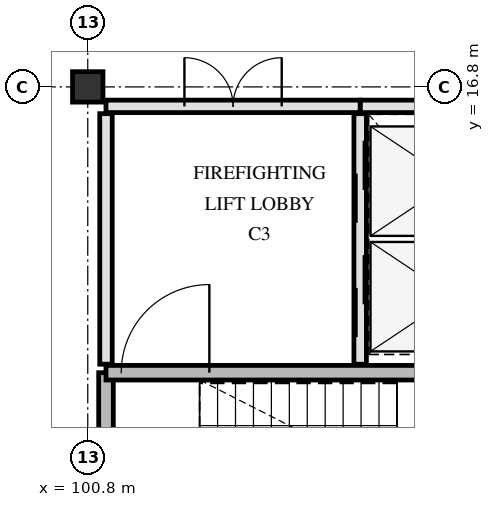
"""IFC4 building model, lengths in metres.
Left out: names, types, materials, properties, quantities, classifications, styles, units other than length and angle.
Written with IfcOpenShell. Run it as: python <this file> out.ifc"""

import sys

from ifc_helpers import new_model, si_unit, direction, frame, frame_2d, origin, origin_2d, place, context, subcontext, project, spatial, rectangle, extrude, element, fill, save


model = new_model("IFC4")
c1 = context("Model", 3, precision=1e-05, world=origin(), true_north=direction((0.0, 1.0)))
c2 = subcontext(c1, "Body", "Model", "MODEL_VIEW")
j1 = project(units=[si_unit("LENGTHUNIT", "METRE"), si_unit("PLANEANGLEUNIT", "RADIAN")], contexts=[c1])
p1 = place(None, origin())
s1 = spatial("IfcSite", under=j1, at=p1, CompositionType="ELEMENT")
p2 = place(p1, origin())
s2 = spatial("IfcBuilding", under=s1, at=p2, CompositionType="ELEMENT")
p3 = place(p2, frame((0.0, 0.0, 26.4)))
s3 = spatial("IfcBuildingStorey", under=s2, at=p3, CompositionType="ELEMENT", Elevation=26.4)
p4 = place(p3, frame((100.8, 16.8, 0.0), z_axis=(0.0, 0.0, 1.0), x_axis=(1.0, 0.0, 0.0)))
e1 = element("IfcColumn", 1, at=p4, inside=s3, PredefinedType="COLUMN", context=c2, shape_type="SweptSolid", body=[
    extrude(rectangle(XDim=0.5, YDim=0.5, at=origin_2d()), origin(), (0.0, 0.0, 1.0), 3.9),
])
p5 = place(p3, frame((101.1, 8.78, 0.0), z_axis=(0.0, 0.0, 1.0), x_axis=(0.0, 1.0, 0.0)))
e2 = element("IfcWall", 2, at=p5, inside=s3, PredefinedType="SHEAR", context=c2, shape_type="SweptSolid", body=[
    extrude(rectangle(XDim=3.32, YDim=0.24, at=frame_2d((1.66, 0.0))), origin(), (0.0, 0.0, 1.0), 3.62),
])
p6 = place(p3, frame((101.1, 12.1, 0.0), z_axis=(0.0, 0.0, 1.0), x_axis=(1.0, 0.0, 0.0)))
e3 = element("IfcWall", 3, at=p6, inside=s3, PredefinedType="SHEAR", context=c2, shape_type="SweptSolid", body=[
    extrude(rectangle(XDim=7.82, YDim=0.24, at=frame_2d((3.91, 0.0))), origin(), (0.0, 0.0, 1.0), 3.62),
])
p7 = place(p6, frame((0.25, 0.0, 0.0)))
e4 = element("IfcOpeningElement", 4, at=p7, cuts=e3, PredefinedType="OPENING", context=c2, shape_type="SweptSolid", body=[
    extrude(rectangle(XDim=1.45, YDim=2.2, at=frame_2d((0.725, 1.1))), frame((0.0, 0.13, 0.0), z_axis=(0.0, -1.0, 0.0), x_axis=(1.0, 0.0, 0.0)), (0.0, 0.0, 1.0), 0.26),
])
p8 = place(p3, frame((105.28, 12.24, 0.0), z_axis=(0.0, 0.0, 1.0), x_axis=(0.0, 1.0, 0.0)))
e5 = element("IfcWall", 5, at=p8, inside=s3, PredefinedType="PARTITIONING", context=c2, shape_type="SweptSolid", body=[
    extrude(rectangle(XDim=4.12, YDim=0.205, at=frame_2d((2.06, 0.0))), origin(), (0.0, 0.0, 1.0), 3.61),
])
p9 = place(p8, frame((0.445, 0.0, 0.0)))
e6 = element("IfcOpeningElement", 6, at=p9, cuts=e5, PredefinedType="OPENING", context=c2, shape_type="SweptSolid", body=[
    extrude(rectangle(XDim=1.35, YDim=2.2, at=frame_2d((0.675, 1.1))), frame((0.0, 0.113, 0.0), z_axis=(0.0, -1.0, 0.0), x_axis=(1.0, 0.0, 0.0)), (0.0, 0.0, 1.0), 0.225),
])
p10 = place(p8, frame((2.325, 0.0, 0.0)))
e7 = element("IfcOpeningElement", 7, at=p10, cuts=e5, PredefinedType="OPENING", context=c2, shape_type="SweptSolid", body=[
    extrude(rectangle(XDim=1.35, YDim=2.2, at=frame_2d((0.675, 1.1))), frame((0.0, 0.113, 0.0), z_axis=(0.0, -1.0, 0.0), x_axis=(1.0, 0.0, 0.0)), (0.0, 0.0, 1.0), 0.225),
])
p11 = place(p3, frame((105.28, 16.48, 0.0), z_axis=(0.0, 0.0, 1.0), x_axis=(1.0, 0.0, 0.0)))
e8 = element("IfcWall", 8, at=p11, inside=s3, PredefinedType="PARTITIONING", context=c2, shape_type="SweptSolid", body=[
    extrude(rectangle(XDim=3.57, YDim=0.205, at=frame_2d((1.785, 0.0))), origin(), (0.0, 0.0, 1.0), 3.61),
])
p12 = place(p3, frame((101.1, 12.24, 0.0), z_axis=(0.0, 0.0, 1.0), x_axis=(0.0, 1.0, 0.0)))
e9 = element("IfcWall", 9, at=p12, inside=s3, PredefinedType="PARTITIONING", context=c2, shape_type="SweptSolid", body=[
    extrude(rectangle(XDim=4.12, YDim=0.205, at=frame_2d((2.06, 0.0))), origin(), (0.0, 0.0, 1.0), 3.61),
])
p13 = place(p3, frame((101.1, 16.48, 0.0), z_axis=(0.0, 0.0, 1.0), x_axis=(1.0, 0.0, 0.0)))
e10 = element("IfcWall", 10, at=p13, inside=s3, PredefinedType="PARTITIONING", context=c2, shape_type="SweptSolid", body=[
    extrude(rectangle(XDim=4.18, YDim=0.205, at=frame_2d((2.09, 0.0))), origin(), (0.0, 0.0, 1.0), 3.61),
])
p14 = place(p13, frame((1.29, 0.0, 0.0)))
e11 = element("IfcOpeningElement", 11, at=p14, cuts=e10, PredefinedType="OPENING", context=c2, shape_type="SweptSolid", body=[
    extrude(rectangle(XDim=1.6, YDim=2.25, at=frame_2d((0.8, 1.125))), frame((0.0, 0.113, 0.0), z_axis=(0.0, -1.0, 0.0), x_axis=(1.0, 0.0, 0.0)), (0.0, 0.0, 1.0), 0.225),
])
p15 = place(p7, origin())
e12 = element("IfcDoor", 12, at=p15, inside=s3, OperationType="SINGLE_SWING_RIGHT", PredefinedType="DOOR", context=c2, shape_type="SweptSolid", body=[
    extrude(rectangle(XDim=1.45, YDim=2.2, at=frame_2d((0.725, 1.1))), frame((0.0, 0.025, 0.0), z_axis=(0.0, -1.0, 0.0), x_axis=(1.0, 0.0, 0.0)), (0.0, 0.0, 1.0), 0.05),
])
fill(e4, e12)
p16 = place(p9, origin())
e13 = element("IfcDoor", 13, at=p16, inside=s3, OperationType="SLIDING_TO_LEFT", PredefinedType="DOOR", context=c2, shape_type="SweptSolid", body=[
    extrude(rectangle(XDim=1.35, YDim=2.2, at=frame_2d((0.675, 1.1))), frame((0.0, 0.025, 0.0), z_axis=(0.0, -1.0, 0.0), x_axis=(1.0, 0.0, 0.0)), (0.0, 0.0, 1.0), 0.05),
])
fill(e6, e13)
p17 = place(p10, origin())
e14 = element("IfcDoor", 14, at=p17, inside=s3, OperationType="SLIDING_TO_LEFT", PredefinedType="DOOR", context=c2, shape_type="SweptSolid", body=[
    extrude(rectangle(XDim=1.35, YDim=2.2, at=frame_2d((0.675, 1.1))), frame((0.0, 0.025, 0.0), z_axis=(0.0, -1.0, 0.0), x_axis=(1.0, 0.0, 0.0)), (0.0, 0.0, 1.0), 0.05),
])
fill(e7, e14)
p18 = place(p14, origin())
e15 = element("IfcDoor", 15, at=p18, inside=s3, OperationType="DOUBLE_SWING_LEFT", PredefinedType="DOOR", context=c2, shape_type="SweptSolid", body=[
    extrude(rectangle(XDim=1.6, YDim=2.25, at=frame_2d((0.8, 1.125))), frame((0.0, 0.025, 0.0), z_axis=(0.0, -1.0, 0.0), x_axis=(1.0, 0.0, 0.0)), (0.0, 0.0, 1.0), 0.05),
])
fill(e11, e15)
save(model, sys.argv[1])
